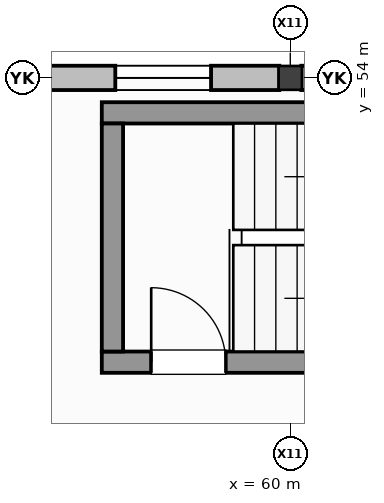
"""IFC4 building model, lengths in metres.
Left out: names, types, materials, properties, quantities, classifications, styles, units other than length and angle.
Written with IfcOpenShell. Run it as: python <this file> out.ifc"""

import sys

from ifc_helpers import new_model, si_unit, direction, frame, frame_2d, origin, origin_2d, place, context, subcontext, project, spatial, rectangle, i_section, extrude, element, fill, save


model = new_model("IFC4")
c1 = context("Model", 3, precision=1e-05, world=origin(), true_north=direction((0.0, 1.0)))
c2 = subcontext(c1, "Body", "Model", "MODEL_VIEW")
j1 = project(units=[si_unit("LENGTHUNIT", "METRE"), si_unit("PLANEANGLEUNIT", "RADIAN")], contexts=[c1])
p1 = place(None, origin())
s1 = spatial("IfcSite", under=j1, at=p1, CompositionType="ELEMENT")
p2 = place(p1, origin())
s2 = spatial("IfcBuilding", under=s1, at=p2, CompositionType="ELEMENT")
p3 = place(p2, frame((0.0, 0.0, 6.0)))
s3 = spatial("IfcBuildingStorey", under=s2, at=p3, CompositionType="ELEMENT", Elevation=6.0)
p4 = place(p3, frame((60.0, 54.0, 0.0), z_axis=(0.0, 0.0, 1.0), x_axis=(1.0, 0.0, 0.0)))
e1 = element("IfcColumn", 1, at=p4, inside=s3, PredefinedType="COLUMN", context=c2, shape_type="SweptSolid", body=[
    extrude(i_section(OverallWidth=0.307, OverallDepth=0.314, WebThickness=0.011, FlangeThickness=0.019, at=origin_2d()), origin(), (0.0, 0.0, 1.0), 4.0),
])
p5 = place(p3, frame((59.855, 54.0, 0.0), z_axis=(0.0, 0.0, 1.0), x_axis=(-1.0, 0.0, 0.0)))
e2 = element("IfcWall", 2, at=p5, inside=s3, PredefinedType="STANDARD", context=c2, shape_type="SweptSolid", body=[
    extrude(rectangle(XDim=5.71, YDim=0.32, at=frame_2d((2.855, 0.0))), origin(), (0.0, 0.0, 1.0), 4.0),
])
p6 = place(p5, frame((0.897, 0.0, 0.86)))
e3 = element("IfcOpeningElement", 3, at=p6, cuts=e2, PredefinedType="OPENING", context=c2, shape_type="SweptSolid", body=[
    extrude(rectangle(XDim=1.26, YDim=1.26, at=frame_2d((0.63, 0.63))), frame((0.0, 0.17, 0.0), z_axis=(0.0, -1.0, 0.0), x_axis=(1.0, 0.0, 0.0)), (0.0, 0.0, 1.0), 0.34),
])
p7 = place(p3, frame((65.855, 54.0, 0.0), z_axis=(0.0, 0.0, 1.0), x_axis=(-1.0, 0.0, 0.0)))
e4 = element("IfcWall", 4, at=p7, inside=s3, PredefinedType="STANDARD", context=c2, shape_type="SweptSolid", body=[
    extrude(rectangle(XDim=5.71, YDim=0.32, at=frame_2d((2.855, 0.0))), origin(), (0.0, 0.0, 1.0), 4.0),
])
p8 = place(p7, frame((0.67, 0.0, 1.18)))
e5 = element("IfcOpeningElement", 5, at=p8, cuts=e4, PredefinedType="OPENING", context=c2, shape_type="SweptSolid", body=[
    extrude(rectangle(XDim=1.32, YDim=1.32, at=frame_2d((0.66, 0.66))), frame((0.0, 0.17, 0.0), z_axis=(0.0, -1.0, 0.0), x_axis=(1.0, 0.0, 0.0)), (0.0, 0.0, 1.0), 0.34),
])
p9 = place(p7, frame((3.504, 0.0, 0.96)))
e6 = element("IfcOpeningElement", 6, at=p9, cuts=e4, PredefinedType="OPENING", context=c2, shape_type="SweptSolid", body=[
    extrude(rectangle(XDim=1.56, YDim=1.56, at=frame_2d((0.78, 0.78))), frame((0.0, 0.17, 0.0), z_axis=(0.0, -1.0, 0.0), x_axis=(1.0, 0.0, 0.0)), (0.0, 0.0, 1.0), 0.34),
])
p10 = place(p3, frame((57.52, 50.26, 0.0), z_axis=(0.0, 0.0, 1.0), x_axis=(1.0, 0.0, 0.0)))
e7 = element("IfcWall", 7, at=p10, inside=s3, PredefinedType="SHEAR", context=c2, shape_type="SweptSolid", body=[
    extrude(rectangle(XDim=8.16, YDim=0.28, at=frame_2d((4.08, 0.0))), origin(), (0.0, 0.0, 1.0), 3.75),
])
p11 = place(p10, frame((0.65, 0.0, 0.0)))
e8 = element("IfcOpeningElement", 8, at=p11, cuts=e7, PredefinedType="OPENING", context=c2, shape_type="SweptSolid", body=[
    extrude(rectangle(XDim=0.98, YDim=2.15, at=frame_2d((0.49, 1.075))), frame((0.0, 0.15, 0.0), z_axis=(0.0, -1.0, 0.0), x_axis=(1.0, 0.0, 0.0)), (0.0, 0.0, 1.0), 0.3),
])
p12 = place(p3, frame((65.68, 53.54, 0.0), z_axis=(0.0, 0.0, 1.0), x_axis=(-1.0, 0.0, 0.0)))
e9 = element("IfcWall", 9, at=p12, inside=s3, PredefinedType="SHEAR", context=c2, shape_type="SweptSolid", body=[
    extrude(rectangle(XDim=8.16, YDim=0.28, at=frame_2d((4.08, 0.0))), origin(), (0.0, 0.0, 1.0), 3.75),
])
p13 = place(p3, frame((57.66, 53.4, 0.0), z_axis=(0.0, 0.0, 1.0), x_axis=(0.0, -1.0, 0.0)))
e10 = element("IfcWall", 10, at=p13, inside=s3, PredefinedType="SHEAR", context=c2, shape_type="SweptSolid", body=[
    extrude(rectangle(XDim=3.0, YDim=0.28, at=frame_2d((1.5, 0.0))), origin(), (0.0, 0.0, 1.0), 3.75),
])
p14 = place(p6, origin())
e11 = element("IfcWindow", 11, at=p14, inside=s3, PartitioningType="SINGLE_PANEL", PredefinedType="WINDOW", context=c2, shape_type="SweptSolid", body=[
    extrude(rectangle(XDim=1.26, YDim=1.26, at=frame_2d((0.63, 0.63))), frame((0.0, 0.03, 0.0), z_axis=(0.0, -1.0, 0.0), x_axis=(1.0, 0.0, 0.0)), (0.0, 0.0, 1.0), 0.06),
])
fill(e3, e11)
p15 = place(p11, origin())
e12 = element("IfcDoor", 12, at=p15, inside=s3, OperationType="SINGLE_SWING_LEFT", PredefinedType="DOOR", context=c2, shape_type="SweptSolid", body=[
    extrude(rectangle(XDim=0.98, YDim=2.15, at=frame_2d((0.49, 1.075))), frame((0.0, 0.025, 0.0), z_axis=(0.0, -1.0, 0.0), x_axis=(1.0, 0.0, 0.0)), (0.0, 0.0, 1.0), 0.05),
])
fill(e8, e12)
save(model, sys.argv[1])
